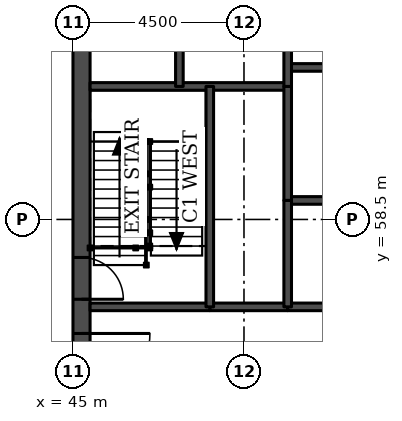
"""IFC4 building model, lengths in metres.
Left out: names, types, materials, properties, quantities, classifications, styles, units other than length and angle.
Written with IfcOpenShell. Run it as: python <this file> out.ifc"""

import sys

from ifc_helpers import new_model, si_unit, direction, frame, frame_2d, origin, place, context, subcontext, project, spatial, rectangle, extrude, element, fill, save


model = new_model("IFC4")
c1 = context("Model", 3, precision=1e-05, world=origin(), true_north=direction((0.0, 1.0)))
c2 = subcontext(c1, "Body", "Model", "MODEL_VIEW")
j1 = project(units=[si_unit("LENGTHUNIT", "METRE"), si_unit("PLANEANGLEUNIT", "RADIAN")], contexts=[c1])
p1 = place(None, origin())
s1 = spatial("IfcSite", under=j1, at=p1, CompositionType="ELEMENT")
p2 = place(p1, origin())
s2 = spatial("IfcBuilding", under=s1, at=p2, CompositionType="ELEMENT")
p3 = place(p2, frame((0.0, 0.0, 127.0)))
s3 = spatial("IfcBuildingStorey", under=s2, at=p3, CompositionType="ELEMENT", Elevation=127.0)
p4 = place(p3, frame((45.225, 49.5, 0.0), z_axis=(0.0, 0.0, 1.0), x_axis=(0.0, 1.0, 0.0)))
e1 = element("IfcWall", 1, at=p4, inside=s3, PredefinedType="SHEAR", context=c2, shape_type="SweptSolid", body=[
    extrude(rectangle(XDim=22.5, YDim=0.45, at=frame_2d((11.25, 0.0))), origin(), (0.0, 0.0, 1.0), 3.7),
])
p5 = place(p4, frame((4.2, 0.0, 0.0)))
e2 = element("IfcOpeningElement", 2, at=p5, cuts=e1, PredefinedType="OPENING", context=c2, shape_type="SweptSolid", body=[
    extrude(rectangle(XDim=1.8, YDim=2.1, at=frame_2d((0.9, 1.05))), frame((0.0, 0.235, 0.0), z_axis=(0.0, -1.0, 0.0), x_axis=(1.0, 0.0, 0.0)), (0.0, 0.0, 1.0), 0.47),
])
p6 = place(p4, frame((6.9, 0.0, 0.0)))
e3 = element("IfcOpeningElement", 3, at=p6, cuts=e1, PredefinedType="OPENING", context=c2, shape_type="SweptSolid", body=[
    extrude(rectangle(XDim=1.1, YDim=2.1, at=frame_2d((0.55, 1.05))), frame((0.0, 0.235, 0.0), z_axis=(0.0, -1.0, 0.0), x_axis=(1.0, 0.0, 0.0)), (0.0, 0.0, 1.0), 0.47),
])
p7 = place(p4, frame((13.6, 0.0, 0.0)))
e4 = element("IfcOpeningElement", 4, at=p7, cuts=e1, PredefinedType="OPENING", context=c2, shape_type="SweptSolid", body=[
    extrude(rectangle(XDim=1.1, YDim=2.1, at=frame_2d((0.55, 1.05))), frame((0.0, 0.235, 0.0), z_axis=(0.0, -1.0, 0.0), x_axis=(1.0, 0.0, 0.0)), (0.0, 0.0, 1.0), 0.47),
])
p8 = place(p4, frame((16.5, 0.0, 0.0)))
e5 = element("IfcOpeningElement", 5, at=p8, cuts=e1, PredefinedType="OPENING", context=c2, shape_type="SweptSolid", body=[
    extrude(rectangle(XDim=1.8, YDim=2.1, at=frame_2d((0.9, 1.05))), frame((0.0, 0.235, 0.0), z_axis=(0.0, -1.0, 0.0), x_axis=(1.0, 0.0, 0.0)), (0.0, 0.0, 1.0), 0.47),
])
p9 = place(p3, frame((48.6, 56.2, 0.0), z_axis=(0.0, 0.0, 1.0), x_axis=(1.0, 0.0, 0.0)))
e6 = element("IfcWall", 6, at=p9, inside=s3, PredefinedType="SOLIDWALL", context=c2, shape_type="SweptSolid", body=[
    extrude(rectangle(XDim=2.05, YDim=0.2, at=frame_2d((1.025, 0.0))), origin(), (0.0, 0.0, 1.0), 3.55),
])
p10 = place(p3, frame((45.45, 56.2, 0.0), z_axis=(0.0, 0.0, 1.0), x_axis=(1.0, 0.0, 0.0)))
e7 = element("IfcWall", 7, at=p10, inside=s3, PredefinedType="SOLIDWALL", context=c2, shape_type="SweptSolid", body=[
    extrude(rectangle(XDim=3.15, YDim=0.2, at=frame_2d((1.575, 0.0))), origin(), (0.0, 0.0, 1.0), 3.55),
])
p11 = place(p3, frame((50.65, 56.2, 0.0), z_axis=(0.0, 0.0, 1.0), x_axis=(1.0, 0.0, 0.0)))
e8 = element("IfcWall", 8, at=p11, inside=s3, PredefinedType="SOLIDWALL", context=c2, shape_type="SweptSolid", body=[
    extrude(rectangle(XDim=11.2, YDim=0.2, at=frame_2d((5.6, 0.0))), origin(), (0.0, 0.0, 1.0), 3.55),
])
p12 = place(p3, frame((50.65, 59.0, 0.0), z_axis=(0.0, 0.0, 1.0), x_axis=(1.0, 0.0, 0.0)))
e9 = element("IfcWall", 9, at=p12, inside=s3, PredefinedType="SOLIDWALL", context=c2, shape_type="SweptSolid", body=[
    extrude(rectangle(XDim=11.2, YDim=0.2, at=frame_2d((5.6, 0.0))), origin(), (0.0, 0.0, 1.0), 3.7),
])
p13 = place(p3, frame((45.45, 62.0, 0.0), z_axis=(0.0, 0.0, 1.0), x_axis=(1.0, 0.0, 0.0)))
e10 = element("IfcWall", 10, at=p13, inside=s3, PredefinedType="SOLIDWALL", context=c2, shape_type="SweptSolid", body=[
    extrude(rectangle(XDim=5.2, YDim=0.2, at=frame_2d((2.6, 0.0))), origin(), (0.0, 0.0, 1.0), 3.55),
])
p14 = place(p3, frame((50.65, 62.5, 0.0), z_axis=(0.0, 0.0, 1.0), x_axis=(1.0, 0.0, 0.0)))
e11 = element("IfcWall", 11, at=p14, inside=s3, PredefinedType="SOLIDWALL", context=c2, shape_type="SweptSolid", body=[
    extrude(rectangle(XDim=11.2, YDim=0.2, at=frame_2d((5.6, 0.0))), origin(), (0.0, 0.0, 1.0), 3.7),
])
p15 = place(p3, frame((47.8, 62.0, 0.0), z_axis=(0.0, 0.0, 1.0), x_axis=(0.0, 1.0, 0.0)))
e12 = element("IfcWall", 12, at=p15, inside=s3, PredefinedType="SOLIDWALL", context=c2, shape_type="SweptSolid", body=[
    extrude(rectangle(XDim=3.3, YDim=0.2, at=frame_2d((1.65, 0.0))), origin(), (0.0, 0.0, 1.0), 3.55),
])
p16 = place(p15, frame((1.1, 0.0, 0.0)))
e13 = element("IfcOpeningElement", 13, at=p16, cuts=e12, PredefinedType="OPENING", context=c2, shape_type="SweptSolid", body=[
    extrude(rectangle(XDim=1.1, YDim=2.1, at=frame_2d((0.55, 1.05))), frame((0.0, 0.11, 0.0), z_axis=(0.0, -1.0, 0.0), x_axis=(1.0, 0.0, 0.0)), (0.0, 0.0, 1.0), 0.22),
])
p17 = place(p3, frame((48.6, 56.2, 0.0), z_axis=(0.0, 0.0, 1.0), x_axis=(0.0, 1.0, 0.0)))
e14 = element("IfcWall", 14, at=p17, inside=s3, PredefinedType="SOLIDWALL", context=c2, shape_type="SweptSolid", body=[
    extrude(rectangle(XDim=5.8, YDim=0.2, at=frame_2d((2.9, 0.0))), origin(), (0.0, 0.0, 1.0), 3.55),
])
p18 = place(p3, frame((50.65, 59.0, 0.0), z_axis=(0.0, 0.0, 1.0), x_axis=(0.0, 1.0, 0.0)))
e15 = element("IfcWall", 15, at=p18, inside=s3, PredefinedType="SOLIDWALL", context=c2, shape_type="SweptSolid", body=[
    extrude(rectangle(XDim=3.0, YDim=0.2, at=frame_2d((1.5, 0.0))), origin(), (0.0, 0.0, 1.0), 3.7),
])
p19 = place(p3, frame((50.65, 56.2, 0.0), z_axis=(0.0, 0.0, 1.0), x_axis=(0.0, 1.0, 0.0)))
e16 = element("IfcWall", 16, at=p19, inside=s3, PredefinedType="SOLIDWALL", context=c2, shape_type="SweptSolid", body=[
    extrude(rectangle(XDim=2.8, YDim=0.2, at=frame_2d((1.4, 0.0))), origin(), (0.0, 0.0, 1.0), 3.55),
])
p20 = place(p3, frame((50.65, 62.0, 0.0), z_axis=(0.0, 0.0, 1.0), x_axis=(0.0, 1.0, 0.0)))
e17 = element("IfcWall", 17, at=p20, inside=s3, PredefinedType="SOLIDWALL", context=c2, shape_type="SweptSolid", body=[
    extrude(rectangle(XDim=3.3, YDim=0.2, at=frame_2d((1.65, 0.0))), origin(), (0.0, 0.0, 1.0), 3.55),
])
p21 = place(p5, frame((1.8, 0.0, 0.0), z_axis=(0.0, 0.0, 1.0), x_axis=(-1.0, 0.0, 0.0)))
e18 = element("IfcDoor", 18, at=p21, inside=s3, OperationType="SINGLE_SWING_LEFT", PredefinedType="DOOR", context=c2, shape_type="SweptSolid", body=[
    extrude(rectangle(XDim=1.8, YDim=2.1, at=frame_2d((0.9, 1.05))), frame((0.0, 0.025, 0.0), z_axis=(0.0, -1.0, 0.0), x_axis=(1.0, 0.0, 0.0)), (0.0, 0.0, 1.0), 0.05),
])
fill(e2, e18)
p22 = place(p6, frame((1.1, 0.0, 0.0), z_axis=(0.0, 0.0, 1.0), x_axis=(-1.0, 0.0, 0.0)))
e19 = element("IfcDoor", 19, at=p22, inside=s3, OperationType="SINGLE_SWING_RIGHT", PredefinedType="DOOR", context=c2, shape_type="SweptSolid", body=[
    extrude(rectangle(XDim=1.1, YDim=2.1, at=frame_2d((0.55, 1.05))), frame((0.0, 0.025, 0.0), z_axis=(0.0, -1.0, 0.0), x_axis=(1.0, 0.0, 0.0)), (0.0, 0.0, 1.0), 0.05),
])
fill(e3, e19)
save(model, sys.argv[1])
